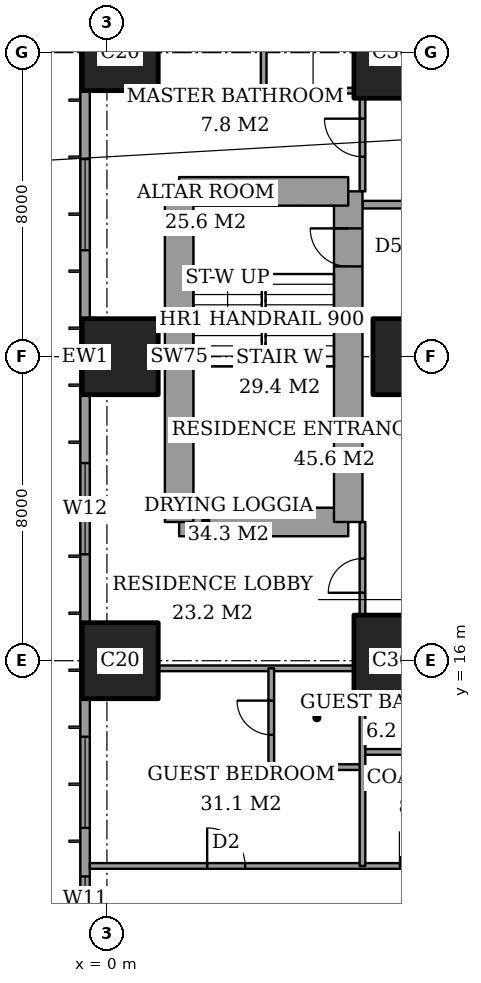
"""IFC4 building model, lengths in metres.
Left out: names, types, materials, properties, quantities, classifications, styles, units other than length and angle.
Written with IfcOpenShell. Run it as: python <this file> out.ifc"""

import sys

from ifc_helpers import new_model, si_unit, direction, frame, frame_2d, origin, origin_2d, place, context, subcontext, project, spatial, rectangle, extrude, element, fill, save


model = new_model("IFC4")
c1 = context("Model", 3, precision=1e-05, world=origin(), true_north=direction((0.0, 1.0)))
c2 = subcontext(c1, "Body", "Model", "MODEL_VIEW")
j1 = project(units=[si_unit("LENGTHUNIT", "METRE"), si_unit("PLANEANGLEUNIT", "RADIAN")], contexts=[c1])
p1 = place(None, origin())
s1 = spatial("IfcSite", under=j1, at=p1, CompositionType="ELEMENT")
p2 = place(p1, origin())
s2 = spatial("IfcBuilding", under=s1, at=p2, CompositionType="ELEMENT")
p3 = place(p2, frame((0.0, 0.0, 107.0)))
s3 = spatial("IfcBuildingStorey", under=s2, at=p3, CompositionType="ELEMENT", Elevation=107.0)
for number, where, z_axis, x_axis in (
    (1, (0.35, 16.0, 0.0), (0.0, 0.0, 1.0), (1.0, 0.0, 0.0)),
    (2, (0.35, 24.0, 0.0), (0.0, 0.0, 1.0), (1.0, 0.0, 0.0)),
    (3, (0.35, 32.0, 0.0), (0.0, 0.0, 1.0), (1.0, 0.0, 0.0)),
):
    element("IfcColumn", number, at=place(p3, frame(where, z_axis=z_axis, x_axis=x_axis)), inside=s3, PredefinedType="COLUMN", context=c2, shape_type="SweptSolid", body=[
        extrude(rectangle(XDim=2.0, YDim=2.0, at=origin_2d()), origin(), (0.0, 0.0, 1.0), 3.6),
    ])
p4 = place(p3, frame((8.0, 16.0, 0.0), z_axis=(0.0, 0.0, 1.0), x_axis=(1.0, 0.0, 0.0)))
e4 = element("IfcColumn", 4, at=p4, inside=s3, PredefinedType="COLUMN", context=c2, shape_type="SweptSolid", body=[
    extrude(rectangle(XDim=3.0, YDim=2.4, at=origin_2d()), origin(), (0.0, 0.0, 1.0), 3.6),
])
p5 = place(p3, frame((8.0, 24.0, 0.0), z_axis=(0.0, 0.0, 1.0), x_axis=(1.0, 0.0, 0.0)))
e5 = element("IfcColumn", 5, at=p5, inside=s3, PredefinedType="COLUMN", context=c2, shape_type="SweptSolid", body=[
    extrude(rectangle(XDim=2.0, YDim=2.0, at=origin_2d()), origin(), (0.0, 0.0, 1.0), 3.6),
])
p6 = place(p3, frame((8.0, 32.0, 0.0), z_axis=(0.0, 0.0, 1.0), x_axis=(1.0, 0.0, 0.0)))
e6 = element("IfcColumn", 6, at=p6, inside=s3, PredefinedType="COLUMN", context=c2, shape_type="SweptSolid", body=[
    extrude(rectangle(XDim=3.0, YDim=2.4, at=origin_2d()), origin(), (0.0, 0.0, 1.0), 3.6),
])
p7 = place(p3, frame((1.9, 19.65, 0.0), z_axis=(0.0, 0.0, 1.0), x_axis=(1.0, 0.0, 0.0)))
e7 = element("IfcWall", 7, at=p7, inside=s3, PredefinedType="SHEAR", context=c2, shape_type="SweptSolid", body=[
    extrude(rectangle(XDim=4.45, YDim=0.75, at=frame_2d((2.225, 0.0))), origin(), (0.0, 0.0, 1.0), 3.6),
])
p8 = place(p3, frame((6.35, 19.65, 0.0), z_axis=(0.0, 0.0, 1.0), x_axis=(0.0, 1.0, 0.0)))
e8 = element("IfcWall", 8, at=p8, inside=s3, PredefinedType="SHEAR", context=c2, shape_type="SweptSolid", body=[
    extrude(rectangle(XDim=8.7, YDim=0.75, at=frame_2d((4.35, 0.0))), origin(), (0.0, 0.0, 1.0), 3.6),
])
p9 = place(p8, frame((6.725, 0.0, 0.0)))
e9 = element("IfcOpeningElement", 9, at=p9, cuts=e8, PredefinedType="OPENING", context=c2, shape_type="SweptSolid", body=[
    extrude(rectangle(XDim=1.0, YDim=2.1, at=frame_2d((0.5, 1.05))), frame((0.0, 0.385, 0.0), z_axis=(0.0, -1.0, 0.0), x_axis=(1.0, 0.0, 0.0)), (0.0, 0.0, 1.0), 0.77),
])
p10 = place(p3, frame((6.35, 28.35, 0.0), z_axis=(0.0, 0.0, 1.0), x_axis=(-1.0, 0.0, 0.0)))
e10 = element("IfcWall", 10, at=p10, inside=s3, PredefinedType="SHEAR", context=c2, shape_type="SweptSolid", body=[
    extrude(rectangle(XDim=4.45, YDim=0.75, at=frame_2d((2.225, 0.0))), origin(), (0.0, 0.0, 1.0), 3.6),
])
p11 = place(p3, frame((1.9, 28.35, 0.0), z_axis=(0.0, 0.0, 1.0), x_axis=(0.0, -1.0, 0.0)))
e11 = element("IfcWall", 11, at=p11, inside=s3, PredefinedType="SHEAR", context=c2, shape_type="SweptSolid", body=[
    extrude(rectangle(XDim=8.7, YDim=0.75, at=frame_2d((4.35, 0.0))), origin(), (0.0, 0.0, 1.0), 3.6),
])
p12 = place(p3, frame((-0.575, 44.825, 0.0), z_axis=(0.0, 0.0, 1.0), x_axis=(0.0, -1.0, 0.0)))
e12 = element("IfcWall", 12, at=p12, inside=s3, PredefinedType="SOLIDWALL", context=c2, shape_type="SweptSolid", body=[
    extrude(rectangle(XDim=41.65, YDim=0.25, at=frame_2d((20.825, 0.0))), origin(), (0.0, 0.0, 1.0), 3.6),
])
p13 = place(p12, frame((0.775, 0.0, 0.4)))
e13 = element("IfcOpeningElement", 13, at=p13, cuts=e12, PredefinedType="OPENING", context=c2, shape_type="SweptSolid", body=[
    extrude(rectangle(XDim=2.4, YDim=2.2, at=frame_2d((1.2, 1.1))), frame((0.0, 0.135, 0.0), z_axis=(0.0, -1.0, 0.0), x_axis=(1.0, 0.0, 0.0)), (0.0, 0.0, 1.0), 0.27),
])
p14 = place(p12, frame((6.2, 0.0, 0.4)))
e14 = element("IfcOpeningElement", 14, at=p14, cuts=e12, PredefinedType="OPENING", context=c2, shape_type="SweptSolid", body=[
    extrude(rectangle(XDim=1.2, YDim=2.2, at=frame_2d((0.6, 1.1))), frame((0.0, 0.135, 0.0), z_axis=(0.0, -1.0, 0.0), x_axis=(1.0, 0.0, 0.0)), (0.0, 0.0, 1.0), 0.27),
])
p15 = place(p12, frame((8.525, 0.0, 0.4)))
e15 = element("IfcOpeningElement", 15, at=p15, cuts=e12, PredefinedType="OPENING", context=c2, shape_type="SweptSolid", body=[
    extrude(rectangle(XDim=2.4, YDim=2.2, at=frame_2d((1.2, 1.1))), frame((0.0, 0.135, 0.0), z_axis=(0.0, -1.0, 0.0), x_axis=(1.0, 0.0, 0.0)), (0.0, 0.0, 1.0), 0.27),
])
p16 = place(p12, frame((15.625, 0.0, 0.4)))
e16 = element("IfcOpeningElement", 16, at=p16, cuts=e12, PredefinedType="OPENING", context=c2, shape_type="SweptSolid", body=[
    extrude(rectangle(XDim=2.4, YDim=2.2, at=frame_2d((1.2, 1.1))), frame((0.0, 0.135, 0.0), z_axis=(0.0, -1.0, 0.0), x_axis=(1.0, 0.0, 0.0)), (0.0, 0.0, 1.0), 0.27),
])
p17 = place(p12, frame((23.625, 0.0, 0.4)))
e17 = element("IfcOpeningElement", 17, at=p17, cuts=e12, PredefinedType="OPENING", context=c2, shape_type="SweptSolid", body=[
    extrude(rectangle(XDim=2.4, YDim=2.2, at=frame_2d((1.2, 1.1))), frame((0.0, 0.135, 0.0), z_axis=(0.0, -1.0, 0.0), x_axis=(1.0, 0.0, 0.0)), (0.0, 0.0, 1.0), 0.27),
])
p18 = place(p12, frame((30.825, 0.0, 0.4)))
e18 = element("IfcOpeningElement", 18, at=p18, cuts=e12, PredefinedType="OPENING", context=c2, shape_type="SweptSolid", body=[
    extrude(rectangle(XDim=2.4, YDim=2.2, at=frame_2d((1.2, 1.1))), frame((0.0, 0.135, 0.0), z_axis=(0.0, -1.0, 0.0), x_axis=(1.0, 0.0, 0.0)), (0.0, 0.0, 1.0), 0.27),
])
p19 = place(p12, frame((34.5, 0.0, 0.4)))
e19 = element("IfcOpeningElement", 19, at=p19, cuts=e12, PredefinedType="OPENING", context=c2, shape_type="SweptSolid", body=[
    extrude(rectangle(XDim=1.2, YDim=2.2, at=frame_2d((0.6, 1.1))), frame((0.0, 0.135, 0.0), z_axis=(0.0, -1.0, 0.0), x_axis=(1.0, 0.0, 0.0)), (0.0, 0.0, 1.0), 0.27),
])
p20 = place(p12, frame((38.475, 0.0, 0.4)))
e20 = element("IfcOpeningElement", 20, at=p20, cuts=e12, PredefinedType="OPENING", context=c2, shape_type="SweptSolid", body=[
    extrude(rectangle(XDim=2.4, YDim=2.2, at=frame_2d((1.2, 1.1))), frame((0.0, 0.135, 0.0), z_axis=(0.0, -1.0, 0.0), x_axis=(1.0, 0.0, 0.0)), (0.0, 0.0, 1.0), 0.27),
])
p21 = place(p3, frame((-0.45, 10.6, 0.0), z_axis=(0.0, 0.0, 1.0), x_axis=(1.0, 0.0, 0.0)))
e21 = element("IfcWall", 21, at=p21, inside=s3, PredefinedType="PARTITIONING", context=c2, shape_type="SweptSolid", body=[
    extrude(rectangle(XDim=25.011, YDim=0.15, at=frame_2d((12.505, 0.0))), origin(), (0.0, 0.0, 1.0), 3.35),
])
p22 = place(p21, frame((10.65, 0.0, 0.0)))
e22 = element("IfcOpeningElement", 22, at=p22, cuts=e21, PredefinedType="OPENING", context=c2, shape_type="SweptSolid", body=[
    extrude(rectangle(XDim=1.0, YDim=2.1, at=frame_2d((0.5, 1.05))), frame((0.0, 0.085, 0.0), z_axis=(0.0, -1.0, 0.0), x_axis=(1.0, 0.0, 0.0)), (0.0, 0.0, 1.0), 0.17),
])
p23 = place(p21, frame((3.087, 0.0, 0.0)))
e23 = element("IfcOpeningElement", 23, at=p23, cuts=e21, PredefinedType="OPENING", context=c2, shape_type="SweptSolid", body=[
    extrude(rectangle(XDim=1.0, YDim=2.1, at=frame_2d((0.5, 1.05))), frame((0.0, 0.085, 0.0), z_axis=(0.0, -1.0, 0.0), x_axis=(1.0, 0.0, 0.0)), (0.0, 0.0, 1.0), 0.17),
])
p24 = place(p21, frame((8.163, 0.0, 0.0)))
e24 = element("IfcOpeningElement", 24, at=p24, cuts=e21, PredefinedType="OPENING", context=c2, shape_type="SweptSolid", body=[
    extrude(rectangle(XDim=0.9, YDim=2.1, at=frame_2d((0.45, 1.05))), frame((0.0, 0.085, 0.0), z_axis=(0.0, -1.0, 0.0), x_axis=(1.0, 0.0, 0.0)), (0.0, 0.0, 1.0), 0.17),
])
p25 = place(p21, frame((13.35, 0.0, 0.0)))
e25 = element("IfcOpeningElement", 25, at=p25, cuts=e21, PredefinedType="OPENING", context=c2, shape_type="SweptSolid", body=[
    extrude(rectangle(XDim=1.0, YDim=2.1, at=frame_2d((0.5, 1.05))), frame((0.0, 0.085, 0.0), z_axis=(0.0, -1.0, 0.0), x_axis=(1.0, 0.0, 0.0)), (0.0, 0.0, 1.0), 0.17),
])
p26 = place(p21, frame((16.5, 0.0, 0.0)))
e26 = element("IfcOpeningElement", 26, at=p26, cuts=e21, PredefinedType="OPENING", context=c2, shape_type="SweptSolid", body=[
    extrude(rectangle(XDim=0.9, YDim=2.1, at=frame_2d((0.45, 1.05))), frame((0.0, 0.085, 0.0), z_axis=(0.0, -1.0, 0.0), x_axis=(1.0, 0.0, 0.0)), (0.0, 0.0, 1.0), 0.17),
])
p27 = place(p21, frame((21.175, 0.0, 0.0)))
e27 = element("IfcOpeningElement", 27, at=p27, cuts=e21, PredefinedType="OPENING", context=c2, shape_type="SweptSolid", body=[
    extrude(rectangle(XDim=1.0, YDim=2.1, at=frame_2d((0.5, 1.05))), frame((0.0, 0.085, 0.0), z_axis=(0.0, -1.0, 0.0), x_axis=(1.0, 0.0, 0.0)), (0.0, 0.0, 1.0), 0.17),
])
p28 = place(p3, frame((4.325, 13.2, 0.0), z_axis=(0.0, 0.0, 1.0), x_axis=(1.0, 0.0, 0.0)))
e28 = element("IfcWall", 28, at=p28, inside=s3, PredefinedType="PARTITIONING", context=c2, shape_type="SweptSolid", body=[
    extrude(rectangle(XDim=2.4, YDim=0.15, at=frame_2d((1.2, 0.0))), origin(), (0.0, 0.0, 1.0), 3.35),
])
p29 = place(p3, frame((6.725, 13.6, 0.0), z_axis=(0.0, 0.0, 1.0), x_axis=(1.0, 0.0, 0.0)))
e29 = element("IfcWall", 29, at=p29, inside=s3, PredefinedType="PARTITIONING", context=c2, shape_type="SweptSolid", body=[
    extrude(rectangle(XDim=2.875, YDim=0.15, at=frame_2d((1.438, 0.0))), origin(), (0.0, 0.0, 1.0), 3.35),
])
p30 = place(p3, frame((1.35, 15.8, 0.0), z_axis=(0.0, 0.0, 1.0), x_axis=(1.0, 0.0, 0.0)))
e30 = element("IfcWall", 30, at=p30, inside=s3, PredefinedType="PARTITIONING", context=c2, shape_type="SweptSolid", body=[
    extrude(rectangle(XDim=5.15, YDim=0.15, at=frame_2d((2.575, 0.0))), origin(), (0.0, 0.0, 1.0), 3.35),
])
p31 = place(p3, frame((6.725, 28.0, 0.0), z_axis=(0.0, 0.0, 1.0), x_axis=(1.0, 0.0, 0.0)))
e31 = element("IfcWall", 31, at=p31, inside=s3, PredefinedType="PARTITIONING", context=c2, shape_type="SweptSolid", body=[
    extrude(rectangle(XDim=17.275, YDim=0.2, at=frame_2d((8.637, 0.0))), origin(), (0.0, 0.0, 1.0), 3.35),
])
p32 = place(p31, frame((7.175, 0.0, 0.0)))
e32 = element("IfcOpeningElement", 32, at=p32, cuts=e31, PredefinedType="OPENING", context=c2, shape_type="SweptSolid", body=[
    extrude(rectangle(XDim=1.2, YDim=2.4, at=frame_2d((0.6, 1.2))), frame((0.0, 0.11, 0.0), z_axis=(0.0, -1.0, 0.0), x_axis=(1.0, 0.0, 0.0)), (0.0, 0.0, 1.0), 0.22),
])
p33 = place(p3, frame((1.35, 31.0, 0.0), z_axis=(0.0, 0.0, 1.0), x_axis=(1.0, 0.0, 0.0)))
e33 = element("IfcWall", 33, at=p33, inside=s3, PredefinedType="PARTITIONING", context=c2, shape_type="SweptSolid", body=[
    extrude(rectangle(XDim=5.15, YDim=0.15, at=frame_2d((2.575, 0.0))), origin(), (0.0, 0.0, 1.0), 3.35),
])
p34 = place(p3, frame((4.125, 31.0, 0.0), z_axis=(0.0, 0.0, 1.0), x_axis=(0.0, 1.0, 0.0)))
e34 = element("IfcWall", 34, at=p34, inside=s3, PredefinedType="PARTITIONING", context=c2, shape_type="SweptSolid", body=[
    extrude(rectangle(XDim=3.0, YDim=0.15, at=frame_2d((1.5, 0.0))), origin(), (0.0, 0.0, 1.0), 3.35),
])
p35 = place(p34, frame((1.05, 0.0, 0.0)))
e35 = element("IfcOpeningElement", 35, at=p35, cuts=e34, PredefinedType="OPENING", context=c2, shape_type="SweptSolid", body=[
    extrude(rectangle(XDim=0.9, YDim=2.1, at=frame_2d((0.45, 1.05))), frame((0.0, 0.085, 0.0), z_axis=(0.0, -1.0, 0.0), x_axis=(1.0, 0.0, 0.0)), (0.0, 0.0, 1.0), 0.17),
])
p36 = place(p3, frame((4.325, 13.2, 0.0), z_axis=(0.0, 0.0, 1.0), x_axis=(0.0, 1.0, 0.0)))
e36 = element("IfcWall", 36, at=p36, inside=s3, PredefinedType="PARTITIONING", context=c2, shape_type="SweptSolid", body=[
    extrude(rectangle(XDim=2.6, YDim=0.15, at=frame_2d((1.3, 0.0))), origin(), (0.0, 0.0, 1.0), 3.35),
])
p37 = place(p36, frame((0.85, 0.0, 0.0)))
e37 = element("IfcOpeningElement", 37, at=p37, cuts=e36, PredefinedType="OPENING", context=c2, shape_type="SweptSolid", body=[
    extrude(rectangle(XDim=0.9, YDim=2.1, at=frame_2d((0.45, 1.05))), frame((0.0, 0.085, 0.0), z_axis=(0.0, -1.0, 0.0), x_axis=(1.0, 0.0, 0.0)), (0.0, 0.0, 1.0), 0.17),
])
p38 = place(p3, frame((6.725, 10.6, 0.0), z_axis=(0.0, 0.0, 1.0), x_axis=(0.0, 1.0, 0.0)))
e38 = element("IfcWall", 38, at=p38, inside=s3, PredefinedType="PARTITIONING", context=c2, shape_type="SweptSolid", body=[
    extrude(rectangle(XDim=4.2, YDim=0.15, at=frame_2d((2.1, 0.0))), origin(), (0.0, 0.0, 1.0), 3.35),
])
p39 = place(p3, frame((6.725, 17.2, 0.0), z_axis=(0.0, 0.0, 1.0), x_axis=(0.0, 1.0, 0.0)))
e39 = element("IfcWall", 39, at=p39, inside=s3, PredefinedType="PARTITIONING", context=c2, shape_type="SweptSolid", body=[
    extrude(rectangle(XDim=2.45, YDim=0.15, at=frame_2d((1.225, 0.0))), origin(), (0.0, 0.0, 1.0), 3.35),
])
p40 = place(p39, frame((0.587, 0.0, 0.0)))
e40 = element("IfcOpeningElement", 40, at=p40, cuts=e39, PredefinedType="OPENING", context=c2, shape_type="SweptSolid", body=[
    extrude(rectangle(XDim=0.9, YDim=2.1, at=frame_2d((0.45, 1.05))), frame((0.0, 0.085, 0.0), z_axis=(0.0, -1.0, 0.0), x_axis=(1.0, 0.0, 0.0)), (0.0, 0.0, 1.0), 0.17),
])
p41 = place(p3, frame((6.725, 28.35, 0.0), z_axis=(0.0, 0.0, 1.0), x_axis=(0.0, 1.0, 0.0)))
e41 = element("IfcWall", 41, at=p41, inside=s3, PredefinedType="PARTITIONING", context=c2, shape_type="SweptSolid", body=[
    extrude(rectangle(XDim=2.45, YDim=0.15, at=frame_2d((1.225, 0.0))), origin(), (0.0, 0.0, 1.0), 3.35),
])
p42 = place(p41, frame((0.913, 0.0, 0.0)))
e42 = element("IfcOpeningElement", 42, at=p42, cuts=e41, PredefinedType="OPENING", context=c2, shape_type="SweptSolid", body=[
    extrude(rectangle(XDim=1.0, YDim=2.1, at=frame_2d((0.5, 1.05))), frame((0.0, 0.085, 0.0), z_axis=(0.0, -1.0, 0.0), x_axis=(1.0, 0.0, 0.0)), (0.0, 0.0, 1.0), 0.17),
])
p43 = place(p16, origin())
e43 = element("IfcWindow", 43, at=p43, inside=s3, PartitioningType="SINGLE_PANEL", PredefinedType="WINDOW", context=c2, shape_type="SweptSolid", body=[
    extrude(rectangle(XDim=2.4, YDim=2.2, at=frame_2d((1.2, 1.1))), frame((0.0, 0.03, 0.0), z_axis=(0.0, -1.0, 0.0), x_axis=(1.0, 0.0, 0.0)), (0.0, 0.0, 1.0), 0.06),
])
fill(e16, e43)
p44 = place(p17, origin())
e44 = element("IfcWindow", 44, at=p44, inside=s3, PartitioningType="SINGLE_PANEL", PredefinedType="WINDOW", context=c2, shape_type="SweptSolid", body=[
    extrude(rectangle(XDim=2.4, YDim=2.2, at=frame_2d((1.2, 1.1))), frame((0.0, 0.03, 0.0), z_axis=(0.0, -1.0, 0.0), x_axis=(1.0, 0.0, 0.0)), (0.0, 0.0, 1.0), 0.06),
])
fill(e17, e44)
p45 = place(p18, origin())
e45 = element("IfcWindow", 45, at=p45, inside=s3, PartitioningType="SINGLE_PANEL", PredefinedType="WINDOW", context=c2, shape_type="SweptSolid", body=[
    extrude(rectangle(XDim=2.4, YDim=2.2, at=frame_2d((1.2, 1.1))), frame((0.0, 0.03, 0.0), z_axis=(0.0, -1.0, 0.0), x_axis=(1.0, 0.0, 0.0)), (0.0, 0.0, 1.0), 0.06),
])
fill(e18, e45)
p46 = place(p19, origin())
e46 = element("IfcWindow", 46, at=p46, inside=s3, PartitioningType="SINGLE_PANEL", PredefinedType="WINDOW", context=c2, shape_type="SweptSolid", body=[
    extrude(rectangle(XDim=1.2, YDim=2.2, at=frame_2d((0.6, 1.1))), frame((0.0, 0.03, 0.0), z_axis=(0.0, -1.0, 0.0), x_axis=(1.0, 0.0, 0.0)), (0.0, 0.0, 1.0), 0.06),
])
fill(e19, e46)
p47 = place(p37, origin())
e47 = element("IfcDoor", 47, at=p47, inside=s3, OperationType="SINGLE_SWING_LEFT", PredefinedType="DOOR", context=c2, shape_type="SweptSolid", body=[
    extrude(rectangle(XDim=0.9, YDim=2.1, at=frame_2d((0.45, 1.05))), frame((0.0, 0.025, 0.0), z_axis=(0.0, -1.0, 0.0), x_axis=(1.0, 0.0, 0.0)), (0.0, 0.0, 1.0), 0.05),
])
fill(e37, e47)
p48 = place(p23, origin())
e48 = element("IfcDoor", 48, at=p48, inside=s3, OperationType="SINGLE_SWING_RIGHT", PredefinedType="DOOR", context=c2, shape_type="SweptSolid", body=[
    extrude(rectangle(XDim=1.0, YDim=2.1, at=frame_2d((0.5, 1.05))), frame((0.0, 0.025, 0.0), z_axis=(0.0, -1.0, 0.0), x_axis=(1.0, 0.0, 0.0)), (0.0, 0.0, 1.0), 0.05),
])
fill(e23, e48)
p49 = place(p40, origin())
e49 = element("IfcDoor", 49, at=p49, inside=s3, OperationType="SINGLE_SWING_RIGHT", PredefinedType="DOOR", context=c2, shape_type="SweptSolid", body=[
    extrude(rectangle(XDim=0.9, YDim=2.1, at=frame_2d((0.45, 1.05))), frame((0.0, 0.025, 0.0), z_axis=(0.0, -1.0, 0.0), x_axis=(1.0, 0.0, 0.0)), (0.0, 0.0, 1.0), 0.05),
])
fill(e40, e49)
p50 = place(p24, origin())
e50 = element("IfcDoor", 50, at=p50, inside=s3, OperationType="SINGLE_SWING_RIGHT", PredefinedType="DOOR", context=c2, shape_type="SweptSolid", body=[
    extrude(rectangle(XDim=0.9, YDim=2.1, at=frame_2d((0.45, 1.05))), frame((0.0, 0.025, 0.0), z_axis=(0.0, -1.0, 0.0), x_axis=(1.0, 0.0, 0.0)), (0.0, 0.0, 1.0), 0.05),
])
fill(e24, e50)
p51 = place(p42, origin())
e51 = element("IfcDoor", 51, at=p51, inside=s3, OperationType="SINGLE_SWING_LEFT", PredefinedType="DOOR", context=c2, shape_type="SweptSolid", body=[
    extrude(rectangle(XDim=1.0, YDim=2.1, at=frame_2d((0.5, 1.05))), frame((0.0, 0.025, 0.0), z_axis=(0.0, -1.0, 0.0), x_axis=(1.0, 0.0, 0.0)), (0.0, 0.0, 1.0), 0.05),
])
fill(e42, e51)
p52 = place(p9, origin())
e52 = element("IfcDoor", 52, at=p52, inside=s3, OperationType="SINGLE_SWING_LEFT", PredefinedType="DOOR", context=c2, shape_type="SweptSolid", body=[
    extrude(rectangle(XDim=1.0, YDim=2.1, at=frame_2d((0.5, 1.05))), frame((0.0, 0.025, 0.0), z_axis=(0.0, -1.0, 0.0), x_axis=(1.0, 0.0, 0.0)), (0.0, 0.0, 1.0), 0.05),
])
fill(e9, e52)
save(model, sys.argv[1])
